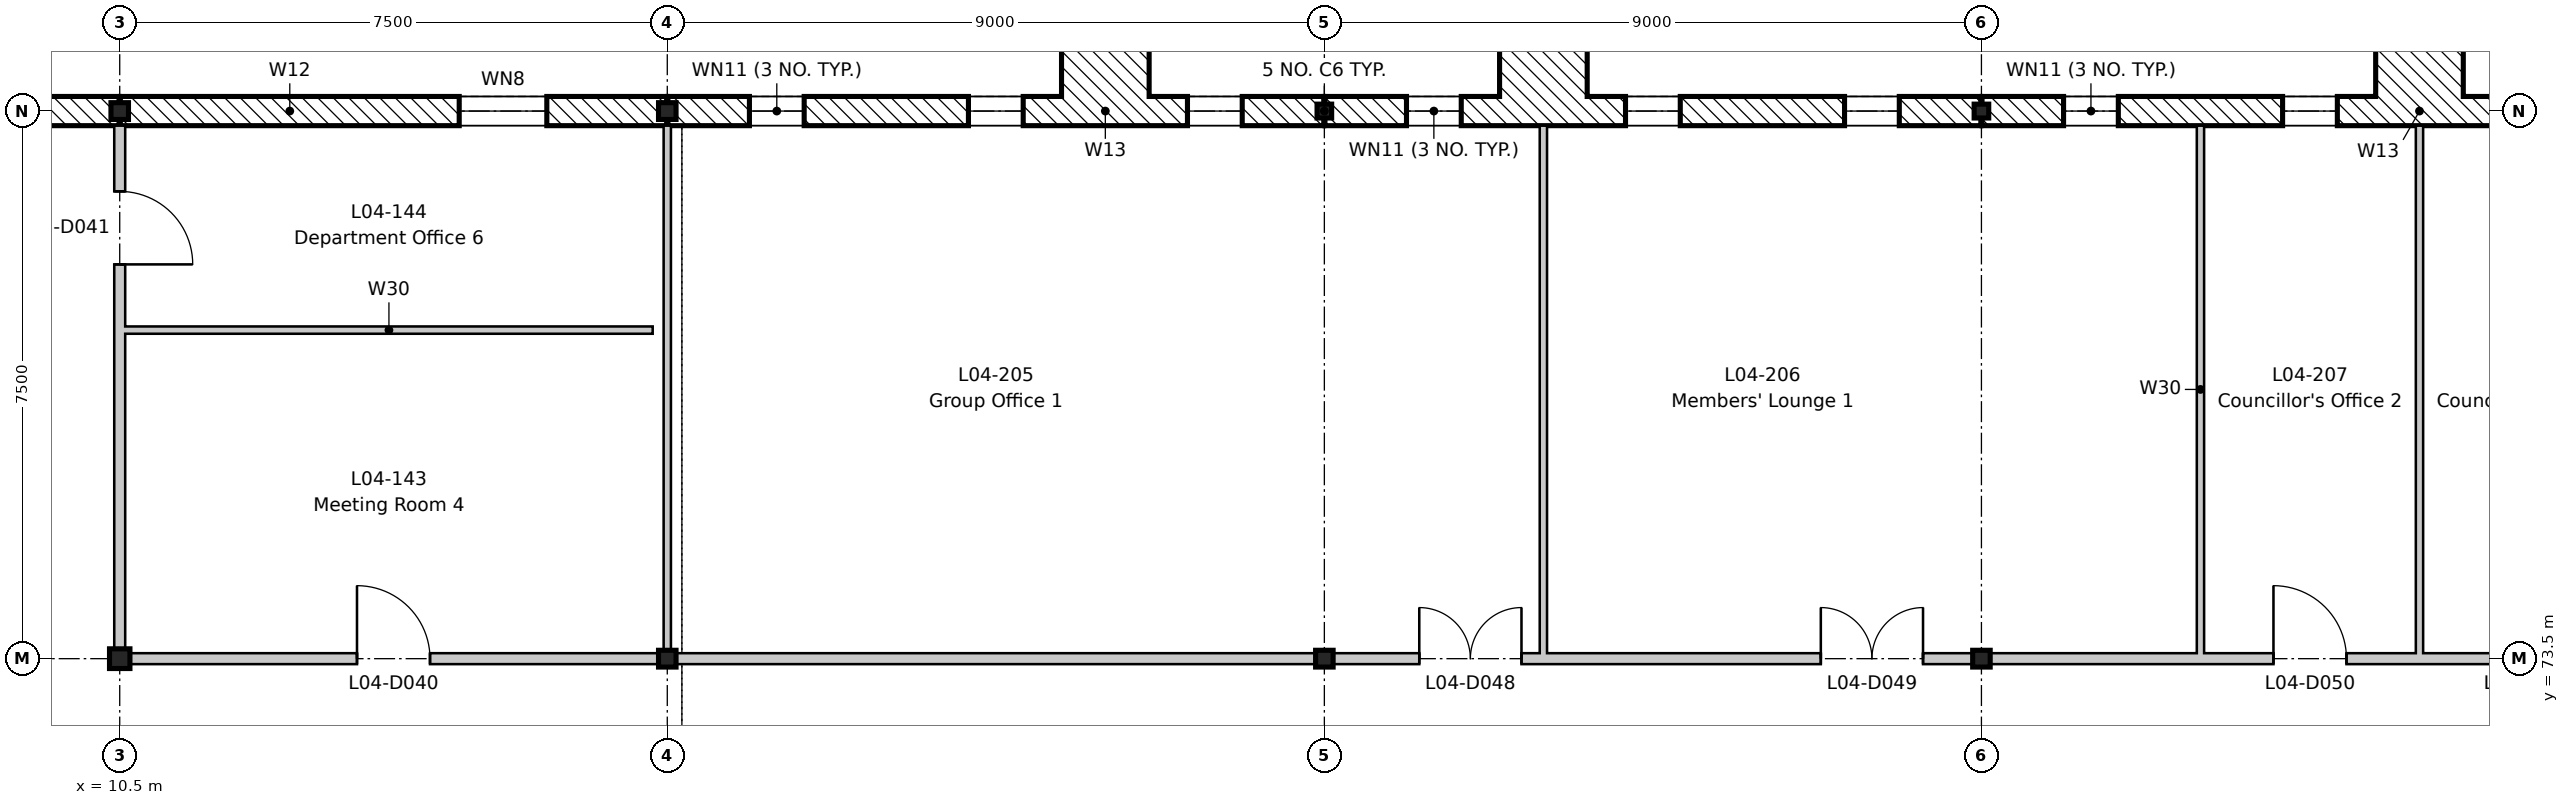
"""IFC4 building model, lengths in metres.
Left out: names, types, materials, properties, quantities, classifications, styles, units other than length and angle.
Written with IfcOpenShell. Run it as: python <this file> out.ifc"""

import sys

from ifc_helpers import new_model, si_unit, direction, frame, frame_2d, origin, origin_2d, place, context, subcontext, project, spatial, rectangle, i_section, extrude, element, fill, save


model = new_model("IFC4")
c1 = context("Model", 3, precision=1e-05, world=origin(), true_north=direction((0.0, 1.0)))
c2 = subcontext(c1, "Body", "Model", "MODEL_VIEW")
j1 = project(units=[si_unit("LENGTHUNIT", "METRE"), si_unit("PLANEANGLEUNIT", "RADIAN")], contexts=[c1])
p1 = place(None, origin())
s1 = spatial("IfcSite", under=j1, at=p1, CompositionType="ELEMENT")
p2 = place(p1, origin())
s2 = spatial("IfcBuilding", under=s1, at=p2, CompositionType="ELEMENT")
p3 = place(p2, frame((0.0, 0.0, 18.6)))
s3 = spatial("IfcBuildingStorey", under=s2, at=p3, CompositionType="ELEMENT", Elevation=18.6)
p4 = place(p3, frame((10.5, 73.5, -0.2), z_axis=(0.0, 0.0, 1.0), x_axis=(1.0, 0.0, 0.0)))
e1 = element("IfcColumn", 1, at=p4, inside=s3, PredefinedType="COLUMN", context=c2, shape_type="SweptSolid", body=[
    extrude(i_section(OverallWidth=0.28, OverallDepth=0.27, WebThickness=0.008, FlangeThickness=0.013, FilletRadius=0.024, at=origin_2d()), origin(), (0.0, 0.0, 1.0), 4.2),
])
for number, where, z_axis, x_axis in (
    (2, (10.5, 81.0, -0.2), (0.0, 0.0, 1.0), (1.0, 0.0, 0.0)),
    (3, (18.0, 73.5, -0.2), (0.0, 0.0, 1.0), (1.0, 0.0, 0.0)),
    (4, (18.0, 81.0, -0.2), (0.0, 0.0, 1.0), (1.0, 0.0, 0.0)),
):
    element("IfcColumn", number, at=place(p3, frame(where, z_axis=z_axis, x_axis=x_axis)), inside=s3, PredefinedType="COLUMN", context=c2, shape_type="SweptSolid", body=[
        extrude(i_section(OverallWidth=0.24, OverallDepth=0.23, WebThickness=0.008, FlangeThickness=0.012, FilletRadius=0.021, at=origin_2d()), origin(), (0.0, 0.0, 1.0), 4.2),
    ])
p5 = place(p3, frame((27.0, 73.5, -0.2), z_axis=(0.0, 0.0, 1.0), x_axis=(1.0, 0.0, 0.0)))
e5 = element("IfcColumn", 5, at=p5, inside=s3, PredefinedType="COLUMN", context=c2, shape_type="SweptSolid", body=[
    extrude(i_section(OverallWidth=0.24, OverallDepth=0.23, WebThickness=0.008, FlangeThickness=0.012, FilletRadius=0.021, at=origin_2d()), origin(), (0.0, 0.0, 1.0), 4.15),
])
p6 = place(p3, frame((27.0, 81.0, -0.2), z_axis=(0.0, 0.0, 1.0), x_axis=(1.0, 0.0, 0.0)))
e6 = element("IfcColumn", 6, at=p6, inside=s3, PredefinedType="COLUMN", context=c2, shape_type="SweptSolid", body=[
    extrude(i_section(OverallWidth=0.2, OverallDepth=0.19, WebThickness=0.007, FlangeThickness=0.01, FilletRadius=0.018, at=origin_2d()), origin(), (0.0, 0.0, 1.0), 4.15),
])
p7 = place(p3, frame((36.0, 73.5, -0.2), z_axis=(0.0, 0.0, 1.0), x_axis=(1.0, 0.0, 0.0)))
e7 = element("IfcColumn", 7, at=p7, inside=s3, PredefinedType="COLUMN", context=c2, shape_type="SweptSolid", body=[
    extrude(i_section(OverallWidth=0.24, OverallDepth=0.23, WebThickness=0.008, FlangeThickness=0.012, FilletRadius=0.021, at=origin_2d()), origin(), (0.0, 0.0, 1.0), 4.15),
])
p8 = place(p3, frame((36.0, 81.0, -0.2), z_axis=(0.0, 0.0, 1.0), x_axis=(1.0, 0.0, 0.0)))
e8 = element("IfcColumn", 8, at=p8, inside=s3, PredefinedType="COLUMN", context=c2, shape_type="SweptSolid", body=[
    extrude(i_section(OverallWidth=0.2, OverallDepth=0.19, WebThickness=0.007, FlangeThickness=0.01, FilletRadius=0.018, at=origin_2d()), origin(), (0.0, 0.0, 1.0), 4.15),
])
p9 = place(p3, frame((7.509, 81.0, 0.0), z_axis=(0.0, 0.0, 1.0), x_axis=(1.0, 0.0, 0.0)))
e9 = element("IfcWall", 9, at=p9, inside=s3, PredefinedType="STANDARD", context=c2, shape_type="SweptSolid", body=[
    extrude(rectangle(XDim=2.982, YDim=0.4, at=frame_2d((1.491, 0.0))), origin(), (0.0, 0.0, 1.0), 3.8),
])
p10 = place(p3, frame((10.509, 81.0, 0.0), z_axis=(0.0, 0.0, 1.0), x_axis=(1.0, 0.0, 0.0)))
e10 = element("IfcWall", 10, at=p10, inside=s3, PredefinedType="STANDARD", context=c2, shape_type="SweptSolid", body=[
    extrude(rectangle(XDim=7.482, YDim=0.4, at=frame_2d((3.741, 0.0))), origin(), (0.0, 0.0, 1.0), 3.67),
])
p11 = place(p10, frame((4.641, 0.0, 0.6)))
e11 = element("IfcOpeningElement", 11, at=p11, cuts=e10, PredefinedType="OPENING", context=c2, shape_type="SweptSolid", body=[
    extrude(rectangle(XDim=1.2, YDim=2.7, at=frame_2d((0.6, 1.35))), frame((0.0, 0.21, 0.0), z_axis=(0.0, -1.0, 0.0), x_axis=(1.0, 0.0, 0.0)), (0.0, 0.0, 1.0), 0.42),
])
p12 = place(p3, frame((18.009, 81.0, 0.0), z_axis=(0.0, 0.0, 1.0), x_axis=(1.0, 0.0, 0.0)))
e12 = element("IfcWall", 12, at=p12, inside=s3, PredefinedType="STANDARD", context=c2, shape_type="SweptSolid", body=[
    extrude(rectangle(XDim=8.983, YDim=0.4, at=frame_2d((4.491, 0.0))), origin(), (0.0, 0.0, 1.0), 3.55),
])
p13 = place(p12, frame((1.116, 0.0, 1.5)))
e13 = element("IfcOpeningElement", 13, at=p13, cuts=e12, PredefinedType="OPENING", context=c2, shape_type="SweptSolid", body=[
    extrude(rectangle(XDim=0.75, YDim=1.2, at=frame_2d((0.375, 0.6))), frame((0.0, 0.21, 0.0), z_axis=(0.0, -1.0, 0.0), x_axis=(1.0, 0.0, 0.0)), (0.0, 0.0, 1.0), 0.42),
])
p14 = place(p12, frame((4.116, 0.0, 1.5)))
e14 = element("IfcOpeningElement", 14, at=p14, cuts=e12, PredefinedType="OPENING", context=c2, shape_type="SweptSolid", body=[
    extrude(rectangle(XDim=0.75, YDim=1.2, at=frame_2d((0.375, 0.6))), frame((0.0, 0.21, 0.0), z_axis=(0.0, -1.0, 0.0), x_axis=(1.0, 0.0, 0.0)), (0.0, 0.0, 1.0), 0.42),
])
p15 = place(p12, frame((7.116, 0.0, 1.5)))
e15 = element("IfcOpeningElement", 15, at=p15, cuts=e12, PredefinedType="OPENING", context=c2, shape_type="SweptSolid", body=[
    extrude(rectangle(XDim=0.75, YDim=1.2, at=frame_2d((0.375, 0.6))), frame((0.0, 0.21, 0.0), z_axis=(0.0, -1.0, 0.0), x_axis=(1.0, 0.0, 0.0)), (0.0, 0.0, 1.0), 0.42),
])
p16 = place(p3, frame((27.008, 81.0, 0.0), z_axis=(0.0, 0.0, 1.0), x_axis=(1.0, 0.0, 0.0)))
e16 = element("IfcWall", 16, at=p16, inside=s3, PredefinedType="STANDARD", context=c2, shape_type="SweptSolid", body=[
    extrude(rectangle(XDim=8.983, YDim=0.4, at=frame_2d((4.492, 0.0))), origin(), (0.0, 0.0, 1.0), 3.55),
])
p17 = place(p16, frame((1.117, 0.0, 1.5)))
e17 = element("IfcOpeningElement", 17, at=p17, cuts=e16, PredefinedType="OPENING", context=c2, shape_type="SweptSolid", body=[
    extrude(rectangle(XDim=0.75, YDim=1.2, at=frame_2d((0.375, 0.6))), frame((0.0, 0.21, 0.0), z_axis=(0.0, -1.0, 0.0), x_axis=(1.0, 0.0, 0.0)), (0.0, 0.0, 1.0), 0.42),
])
p18 = place(p16, frame((4.117, 0.0, 1.5)))
e18 = element("IfcOpeningElement", 18, at=p18, cuts=e16, PredefinedType="OPENING", context=c2, shape_type="SweptSolid", body=[
    extrude(rectangle(XDim=0.75, YDim=1.2, at=frame_2d((0.375, 0.6))), frame((0.0, 0.21, 0.0), z_axis=(0.0, -1.0, 0.0), x_axis=(1.0, 0.0, 0.0)), (0.0, 0.0, 1.0), 0.42),
])
p19 = place(p16, frame((7.117, 0.0, 1.5)))
e19 = element("IfcOpeningElement", 19, at=p19, cuts=e16, PredefinedType="OPENING", context=c2, shape_type="SweptSolid", body=[
    extrude(rectangle(XDim=0.75, YDim=1.2, at=frame_2d((0.375, 0.6))), frame((0.0, 0.21, 0.0), z_axis=(0.0, -1.0, 0.0), x_axis=(1.0, 0.0, 0.0)), (0.0, 0.0, 1.0), 0.42),
])
p20 = place(p3, frame((36.008, 81.0, 0.0), z_axis=(0.0, 0.0, 1.0), x_axis=(1.0, 0.0, 0.0)))
e20 = element("IfcWall", 20, at=p20, inside=s3, PredefinedType="STANDARD", context=c2, shape_type="SweptSolid", body=[
    extrude(rectangle(XDim=8.983, YDim=0.4, at=frame_2d((4.492, 0.0))), origin(), (0.0, 0.0, 1.0), 3.55),
])
p21 = place(p20, frame((1.117, 0.0, 1.5)))
e21 = element("IfcOpeningElement", 21, at=p21, cuts=e20, PredefinedType="OPENING", context=c2, shape_type="SweptSolid", body=[
    extrude(rectangle(XDim=0.75, YDim=1.2, at=frame_2d((0.375, 0.6))), frame((0.0, 0.21, 0.0), z_axis=(0.0, -1.0, 0.0), x_axis=(1.0, 0.0, 0.0)), (0.0, 0.0, 1.0), 0.42),
])
p22 = place(p20, frame((4.117, 0.0, 1.5)))
e22 = element("IfcOpeningElement", 22, at=p22, cuts=e20, PredefinedType="OPENING", context=c2, shape_type="SweptSolid", body=[
    extrude(rectangle(XDim=0.75, YDim=1.2, at=frame_2d((0.375, 0.6))), frame((0.0, 0.21, 0.0), z_axis=(0.0, -1.0, 0.0), x_axis=(1.0, 0.0, 0.0)), (0.0, 0.0, 1.0), 0.42),
])
p23 = place(p20, frame((7.117, 0.0, 1.5)))
e23 = element("IfcOpeningElement", 23, at=p23, cuts=e20, PredefinedType="OPENING", context=c2, shape_type="SweptSolid", body=[
    extrude(rectangle(XDim=0.75, YDim=1.2, at=frame_2d((0.375, 0.6))), frame((0.0, 0.21, 0.0), z_axis=(0.0, -1.0, 0.0), x_axis=(1.0, 0.0, 0.0)), (0.0, 0.0, 1.0), 0.42),
])
for number, where, z_axis, x_axis in (
    (24, (23.4, 81.8, 0.0), (0.0, 0.0, 1.0), (1.0, 0.0, 0.0)),
    (25, (29.4, 81.8, 0.0), (0.0, 0.0, 1.0), (1.0, 0.0, 0.0)),
    (26, (41.4, 81.8, 0.0), (0.0, 0.0, 1.0), (1.0, 0.0, 0.0)),
):
    element("IfcWall", number, at=place(p3, frame(where, z_axis=z_axis, x_axis=x_axis)), inside=s3, PredefinedType="STANDARD", context=c2, shape_type="SweptSolid", body=[
        extrude(rectangle(XDim=1.2, YDim=1.2, at=frame_2d((0.6, 0.0))), origin(), (0.0, 0.0, 1.0), 3.35),
    ])
p24 = place(p3, frame((10.5, 73.5, 0.0), z_axis=(0.0, 0.0, 1.0), x_axis=(0.0, 1.0, 0.0)))
e27 = element("IfcWall", 27, at=p24, inside=s3, PredefinedType="PARTITIONING", context=c2, shape_type="SweptSolid", body=[
    extrude(rectangle(XDim=7.3, YDim=0.15, at=frame_2d((3.65, 0.0))), origin(), (0.0, 0.0, 1.0), 3.48),
])
p25 = place(p24, frame((5.4, 0.0, 0.0)))
e28 = element("IfcOpeningElement", 28, at=p25, cuts=e27, PredefinedType="OPENING", context=c2, shape_type="SweptSolid", body=[
    extrude(rectangle(XDim=1.0, YDim=2.1, at=frame_2d((0.5, 1.05))), frame((0.0, 0.085, 0.0), z_axis=(0.0, -1.0, 0.0), x_axis=(1.0, 0.0, 0.0)), (0.0, 0.0, 1.0), 0.17),
])
p26 = place(p3, frame((10.575, 73.5, 0.0), z_axis=(0.0, 0.0, 1.0), x_axis=(1.0, 0.0, 0.0)))
e29 = element("IfcWall", 29, at=p26, inside=s3, PredefinedType="PARTITIONING", context=c2, shape_type="SweptSolid", body=[
    extrude(rectangle(XDim=7.425, YDim=0.15, at=frame_2d((3.712, 0.0))), origin(), (0.0, 0.0, 1.0), 3.65),
])
p27 = place(p26, frame((3.175, 0.0, 0.0)))
e30 = element("IfcOpeningElement", 30, at=p27, cuts=e29, PredefinedType="OPENING", context=c2, shape_type="SweptSolid", body=[
    extrude(rectangle(XDim=1.0, YDim=2.1, at=frame_2d((0.5, 1.05))), frame((0.0, 0.085, 0.0), z_axis=(0.0, -1.0, 0.0), x_axis=(1.0, 0.0, 0.0)), (0.0, 0.0, 1.0), 0.17),
])
p28 = place(p3, frame((10.575, 78.0, 0.0), z_axis=(0.0, 0.0, 1.0), x_axis=(1.0, 0.0, 0.0)))
e31 = element("IfcWall", 31, at=p28, inside=s3, PredefinedType="PARTITIONING", context=c2, shape_type="SweptSolid", body=[
    extrude(rectangle(XDim=7.225, YDim=0.1, at=frame_2d((3.613, 0.0))), origin(), (0.0, 0.0, 1.0), 4.0),
])
p29 = place(p3, frame((18.0, 73.575, 0.0), z_axis=(0.0, 0.0, 1.0), x_axis=(0.0, 1.0, 0.0)))
e32 = element("IfcWall", 32, at=p29, inside=s3, PredefinedType="PARTITIONING", context=c2, shape_type="SweptSolid", body=[
    extrude(rectangle(XDim=7.225, YDim=0.1, at=frame_2d((3.613, 0.0))), origin(), (0.0, 0.0, 1.0), 3.58),
])
for number, where, z_axis, x_axis in (
    (33, (30.0, 73.575, 0.0), (0.0, 0.0, 1.0), (0.0, 1.0, 0.0)),
    (34, (39.0, 73.575, 0.0), (0.0, 0.0, 1.0), (0.0, 1.0, 0.0)),
    (35, (42.0, 73.575, 0.0), (0.0, 0.0, 1.0), (0.0, 1.0, 0.0)),
):
    element("IfcWall", number, at=place(p3, frame(where, z_axis=z_axis, x_axis=x_axis)), inside=s3, PredefinedType="PARTITIONING", context=c2, shape_type="SweptSolid", body=[
        extrude(rectangle(XDim=7.225, YDim=0.1, at=frame_2d((3.613, 0.0))), origin(), (0.0, 0.0, 1.0), 3.95),
    ])
p30 = place(p3, frame((18.0, 73.5, 0.0), z_axis=(0.0, 0.0, 1.0), x_axis=(1.0, 0.0, 0.0)))
e36 = element("IfcWall", 36, at=p30, inside=s3, PredefinedType="PARTITIONING", context=c2, shape_type="SweptSolid", body=[
    extrude(rectangle(XDim=35.8, YDim=0.15, at=frame_2d((17.9, 0.0))), origin(), (0.0, 0.0, 1.0), 3.43),
])
p31 = place(p30, frame((10.3, 0.0, 0.0)))
e37 = element("IfcOpeningElement", 37, at=p31, cuts=e36, PredefinedType="OPENING", context=c2, shape_type="SweptSolid", body=[
    extrude(rectangle(XDim=1.4, YDim=2.1, at=frame_2d((0.7, 1.05))), frame((0.0, 0.085, 0.0), z_axis=(0.0, -1.0, 0.0), x_axis=(1.0, 0.0, 0.0)), (0.0, 0.0, 1.0), 0.17),
])
p32 = place(p30, frame((15.8, 0.0, 0.0)))
e38 = element("IfcOpeningElement", 38, at=p32, cuts=e36, PredefinedType="OPENING", context=c2, shape_type="SweptSolid", body=[
    extrude(rectangle(XDim=1.4, YDim=2.1, at=frame_2d((0.7, 1.05))), frame((0.0, 0.085, 0.0), z_axis=(0.0, -1.0, 0.0), x_axis=(1.0, 0.0, 0.0)), (0.0, 0.0, 1.0), 0.17),
])
p33 = place(p30, frame((22.0, 0.0, 0.0)))
e39 = element("IfcOpeningElement", 39, at=p33, cuts=e36, PredefinedType="OPENING", context=c2, shape_type="SweptSolid", body=[
    extrude(rectangle(XDim=1.0, YDim=2.1, at=frame_2d((0.5, 1.05))), frame((0.0, 0.085, 0.0), z_axis=(0.0, -1.0, 0.0), x_axis=(1.0, 0.0, 0.0)), (0.0, 0.0, 1.0), 0.17),
])
p34 = place(p30, frame((25.0, 0.0, 0.0)))
e40 = element("IfcOpeningElement", 40, at=p34, cuts=e36, PredefinedType="OPENING", context=c2, shape_type="SweptSolid", body=[
    extrude(rectangle(XDim=1.0, YDim=2.1, at=frame_2d((0.5, 1.05))), frame((0.0, 0.085, 0.0), z_axis=(0.0, -1.0, 0.0), x_axis=(1.0, 0.0, 0.0)), (0.0, 0.0, 1.0), 0.17),
])
p35 = place(p30, frame((30.8, 0.0, 0.0)))
e41 = element("IfcOpeningElement", 41, at=p35, cuts=e36, PredefinedType="OPENING", context=c2, shape_type="SweptSolid", body=[
    extrude(rectangle(XDim=1.4, YDim=2.1, at=frame_2d((0.7, 1.05))), frame((0.0, 0.085, 0.0), z_axis=(0.0, -1.0, 0.0), x_axis=(1.0, 0.0, 0.0)), (0.0, 0.0, 1.0), 0.17),
])
p36 = place(p11, origin())
e42 = element("IfcWindow", 42, at=p36, inside=s3, PartitioningType="SINGLE_PANEL", PredefinedType="WINDOW", context=c2, shape_type="SweptSolid", body=[
    extrude(rectangle(XDim=1.2, YDim=2.7, at=frame_2d((0.6, 1.35))), frame((0.0, 0.03, 0.0), z_axis=(0.0, -1.0, 0.0), x_axis=(1.0, 0.0, 0.0)), (0.0, 0.0, 1.0), 0.06),
])
fill(e11, e42)
p37 = place(p13, origin())
e43 = element("IfcWindow", 43, at=p37, inside=s3, PartitioningType="SINGLE_PANEL", PredefinedType="WINDOW", context=c2, shape_type="SweptSolid", body=[
    extrude(rectangle(XDim=0.75, YDim=1.2, at=frame_2d((0.375, 0.6))), frame((0.0, -0.12, 0.0), z_axis=(0.0, -1.0, 0.0), x_axis=(1.0, 0.0, 0.0)), (0.0, 0.0, 1.0), 0.06),
])
fill(e13, e43)
p38 = place(p14, origin())
e44 = element("IfcWindow", 44, at=p38, inside=s3, PartitioningType="SINGLE_PANEL", PredefinedType="WINDOW", context=c2, shape_type="SweptSolid", body=[
    extrude(rectangle(XDim=0.75, YDim=1.2, at=frame_2d((0.375, 0.6))), frame((0.0, -0.12, 0.0), z_axis=(0.0, -1.0, 0.0), x_axis=(1.0, 0.0, 0.0)), (0.0, 0.0, 1.0), 0.06),
])
fill(e14, e44)
p39 = place(p15, origin())
e45 = element("IfcWindow", 45, at=p39, inside=s3, PartitioningType="SINGLE_PANEL", PredefinedType="WINDOW", context=c2, shape_type="SweptSolid", body=[
    extrude(rectangle(XDim=0.75, YDim=1.2, at=frame_2d((0.375, 0.6))), frame((0.0, -0.12, 0.0), z_axis=(0.0, -1.0, 0.0), x_axis=(1.0, 0.0, 0.0)), (0.0, 0.0, 1.0), 0.06),
])
fill(e15, e45)
p40 = place(p17, origin())
e46 = element("IfcWindow", 46, at=p40, inside=s3, PartitioningType="SINGLE_PANEL", PredefinedType="WINDOW", context=c2, shape_type="SweptSolid", body=[
    extrude(rectangle(XDim=0.75, YDim=1.2, at=frame_2d((0.375, 0.6))), frame((0.0, -0.12, 0.0), z_axis=(0.0, -1.0, 0.0), x_axis=(1.0, 0.0, 0.0)), (0.0, 0.0, 1.0), 0.06),
])
fill(e17, e46)
p41 = place(p18, origin())
e47 = element("IfcWindow", 47, at=p41, inside=s3, PartitioningType="SINGLE_PANEL", PredefinedType="WINDOW", context=c2, shape_type="SweptSolid", body=[
    extrude(rectangle(XDim=0.75, YDim=1.2, at=frame_2d((0.375, 0.6))), frame((0.0, -0.12, 0.0), z_axis=(0.0, -1.0, 0.0), x_axis=(1.0, 0.0, 0.0)), (0.0, 0.0, 1.0), 0.06),
])
fill(e18, e47)
p42 = place(p19, origin())
e48 = element("IfcWindow", 48, at=p42, inside=s3, PartitioningType="SINGLE_PANEL", PredefinedType="WINDOW", context=c2, shape_type="SweptSolid", body=[
    extrude(rectangle(XDim=0.75, YDim=1.2, at=frame_2d((0.375, 0.6))), frame((0.0, -0.12, 0.0), z_axis=(0.0, -1.0, 0.0), x_axis=(1.0, 0.0, 0.0)), (0.0, 0.0, 1.0), 0.06),
])
fill(e19, e48)
p43 = place(p21, origin())
e49 = element("IfcWindow", 49, at=p43, inside=s3, PartitioningType="SINGLE_PANEL", PredefinedType="WINDOW", context=c2, shape_type="SweptSolid", body=[
    extrude(rectangle(XDim=0.75, YDim=1.2, at=frame_2d((0.375, 0.6))), frame((0.0, -0.12, 0.0), z_axis=(0.0, -1.0, 0.0), x_axis=(1.0, 0.0, 0.0)), (0.0, 0.0, 1.0), 0.06),
])
fill(e21, e49)
p44 = place(p22, origin())
e50 = element("IfcWindow", 50, at=p44, inside=s3, PartitioningType="SINGLE_PANEL", PredefinedType="WINDOW", context=c2, shape_type="SweptSolid", body=[
    extrude(rectangle(XDim=0.75, YDim=1.2, at=frame_2d((0.375, 0.6))), frame((0.0, -0.12, 0.0), z_axis=(0.0, -1.0, 0.0), x_axis=(1.0, 0.0, 0.0)), (0.0, 0.0, 1.0), 0.06),
])
fill(e22, e50)
p45 = place(p27, origin())
e51 = element("IfcDoor", 51, at=p45, inside=s3, OperationType="SINGLE_SWING_LEFT", PredefinedType="DOOR", context=c2, shape_type="SweptSolid", body=[
    extrude(rectangle(XDim=1.0, YDim=2.1, at=frame_2d((0.5, 1.05))), frame((0.0, 0.025, 0.0), z_axis=(0.0, -1.0, 0.0), x_axis=(1.0, 0.0, 0.0)), (0.0, 0.0, 1.0), 0.05),
])
fill(e30, e51)
p46 = place(p25, frame((1.0, 0.0, 0.0), z_axis=(0.0, 0.0, 1.0), x_axis=(-1.0, 0.0, 0.0)))
e52 = element("IfcDoor", 52, at=p46, inside=s3, OperationType="SINGLE_SWING_RIGHT", PredefinedType="DOOR", context=c2, shape_type="SweptSolid", body=[
    extrude(rectangle(XDim=1.0, YDim=2.1, at=frame_2d((0.5, 1.05))), frame((0.0, 0.025, 0.0), z_axis=(0.0, -1.0, 0.0), x_axis=(1.0, 0.0, 0.0)), (0.0, 0.0, 1.0), 0.05),
])
fill(e28, e52)
p47 = place(p31, origin())
e53 = element("IfcDoor", 53, at=p47, inside=s3, OperationType="DOUBLE_DOOR_SINGLE_SWING", PredefinedType="DOOR", context=c2, shape_type="SweptSolid", body=[
    extrude(rectangle(XDim=1.4, YDim=2.1, at=frame_2d((0.7, 1.05))), frame((0.0, 0.025, 0.0), z_axis=(0.0, -1.0, 0.0), x_axis=(1.0, 0.0, 0.0)), (0.0, 0.0, 1.0), 0.05),
])
fill(e37, e53)
p48 = place(p32, origin())
e54 = element("IfcDoor", 54, at=p48, inside=s3, OperationType="DOUBLE_DOOR_SINGLE_SWING", PredefinedType="DOOR", context=c2, shape_type="SweptSolid", body=[
    extrude(rectangle(XDim=1.4, YDim=2.1, at=frame_2d((0.7, 1.05))), frame((0.0, 0.025, 0.0), z_axis=(0.0, -1.0, 0.0), x_axis=(1.0, 0.0, 0.0)), (0.0, 0.0, 1.0), 0.05),
])
fill(e38, e54)
p49 = place(p33, origin())
e55 = element("IfcDoor", 55, at=p49, inside=s3, OperationType="SINGLE_SWING_LEFT", PredefinedType="DOOR", context=c2, shape_type="SweptSolid", body=[
    extrude(rectangle(XDim=1.0, YDim=2.1, at=frame_2d((0.5, 1.05))), frame((0.0, 0.025, 0.0), z_axis=(0.0, -1.0, 0.0), x_axis=(1.0, 0.0, 0.0)), (0.0, 0.0, 1.0), 0.05),
])
fill(e39, e55)
save(model, sys.argv[1])
